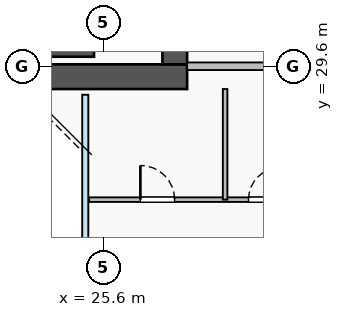
"""IFC4 building model, lengths in metres.
Left out: names, types, materials, properties, quantities, classifications, styles, units other than length and angle.
Written with IfcOpenShell. Run it as: python <this file> out.ifc"""

import sys

from ifc_helpers import new_model, si_unit, direction, frame, frame_2d, origin, place, context, subcontext, project, spatial, rectangle, extrude, source, transform, mapped, element, fill, save


model = new_model("IFC4")
c1 = context("Model", 3, precision=1e-05, world=origin(), true_north=direction((0.0, 1.0)))
c2 = subcontext(c1, "Body", "Model", "MODEL_VIEW")
j1 = project(units=[si_unit("LENGTHUNIT", "METRE"), si_unit("PLANEANGLEUNIT", "RADIAN")], contexts=[c1])
p1 = place(None, origin())
s1 = spatial("IfcSite", under=j1, at=p1, CompositionType="ELEMENT")
p2 = place(p1, origin())
s2 = spatial("IfcBuilding", under=s1, at=p2, CompositionType="ELEMENT")
p3 = place(p2, frame((0.0, 0.0, 100.25)))
s3 = spatial("IfcBuildingStorey", under=s2, at=p3, CompositionType="ELEMENT", Elevation=100.25)
p4 = place(p3, frame((18.2, 29.95, 0.0), z_axis=(0.0, 0.0, 1.0), x_axis=(1.0, 0.0, 0.0)))
e1 = element("IfcWall", 1, at=p4, inside=s3, PredefinedType="SHEAR", context=c2, shape_type="SweptSolid", body=[
    extrude(rectangle(XDim=7.15, YDim=0.2, at=frame_2d((3.575, 0.0))), origin(), (0.0, 0.0, 1.0), 3.25),
])
p5 = place(p3, frame((10.2, 29.325, 0.0), z_axis=(0.0, 0.0, 1.0), x_axis=(1.0, 0.0, 0.0)))
e2 = element("IfcWall", 2, at=p5, inside=s3, PredefinedType="SHEAR", context=c2, shape_type="SweptSolid", body=[
    extrude(rectangle(XDim=17.6, YDim=0.65, at=frame_2d((8.8, 0.0))), origin(), (0.0, 0.0, 1.0), 3.25),
])
p6 = place(p3, frame((27.475, 29.65, 0.0), z_axis=(0.0, 0.0, 1.0), x_axis=(0.0, 1.0, 0.0)))
e3 = element("IfcWall", 3, at=p6, inside=s3, PredefinedType="SHEAR", context=c2, shape_type="SweptSolid", body=[
    extrude(rectangle(XDim=5.9, YDim=0.65, at=frame_2d((2.95, 0.0))), origin(), (0.0, 0.0, 1.0), 3.25),
])
p7 = place(p6, frame((1.1, 0.0, 0.0)))
e4 = element("IfcOpeningElement", 4, at=p7, cuts=e3, PredefinedType="OPENING", context=c2, shape_type="SweptSolid", body=[
    extrude(rectangle(XDim=1.3, YDim=2.05, at=frame_2d((0.65, 1.025))), frame((0.0, 0.335, 0.0), z_axis=(0.0, -1.0, 0.0), x_axis=(1.0, 0.0, 0.0)), (0.0, 0.0, 1.0), 0.67),
])
p8 = place(p3, frame((27.8, 29.6, 0.0), z_axis=(0.0, 0.0, 1.0), x_axis=(1.0, 0.0, 0.0)))
e5 = element("IfcWall", 5, at=p8, inside=s3, PredefinedType="PARTITIONING", context=c2, shape_type="SweptSolid", body=[
    extrude(rectangle(XDim=3.1, YDim=0.2, at=frame_2d((1.55, 0.0))), origin(), (0.0, 0.0, 1.0), 3.07),
])
p9 = place(p3, frame((25.22, 26.09, 0.0), z_axis=(0.0, 0.0, 1.0), x_axis=(1.0, 0.0, 0.0)))
e6 = element("IfcWall", 6, at=p9, inside=s3, PredefinedType="PLUMBINGWALL", context=c2, shape_type="SweptSolid", body=[
    extrude(rectangle(XDim=5.68, YDim=0.12, at=frame_2d((2.84, 0.0))), origin(), (0.0, 0.0, 1.0), 2.625),
])
p10 = place(p9, frame((1.35, 0.0, 0.0)))
e7 = element("IfcOpeningElement", 7, at=p10, cuts=e6, PredefinedType="OPENING", context=c2, shape_type="SweptSolid", body=[
    extrude(rectangle(XDim=0.9, YDim=2.05, at=frame_2d((0.45, 1.025))), frame((0.0, 0.07, 0.0), z_axis=(0.0, -1.0, 0.0), x_axis=(1.0, 0.0, 0.0)), (0.0, 0.0, 1.0), 0.14),
])
p11 = place(p9, frame((4.195, 0.0, 0.0)))
e8 = element("IfcOpeningElement", 8, at=p11, cuts=e6, PredefinedType="OPENING", context=c2, shape_type="SweptSolid", body=[
    extrude(rectangle(XDim=0.85, YDim=2.05, at=frame_2d((0.425, 1.025))), frame((0.0, 0.07, 0.0), z_axis=(0.0, -1.0, 0.0), x_axis=(1.0, 0.0, 0.0)), (0.0, 0.0, 1.0), 0.14),
])
p12 = place(p3, frame((28.8, 26.09, 0.0), z_axis=(0.0, 0.0, 1.0), x_axis=(0.0, 1.0, 0.0)))
e9 = element("IfcWall", 9, at=p12, inside=s3, PredefinedType="PLUMBINGWALL", context=c2, shape_type="SweptSolid", body=[
    extrude(rectangle(XDim=2.91, YDim=0.12, at=frame_2d((1.455, 0.0))), origin(), (0.0, 0.0, 1.0), 3.07),
])
m1 = source(origin(), c2, "Body", "SweptSolid", [
    extrude(rectangle(XDim=0.9, YDim=2.05, at=frame_2d((0.45, 1.025))), frame((0.0, 0.025, 0.0), z_axis=(0.0, -1.0, 0.0), x_axis=(1.0, 0.0, 0.0)), (0.0, 0.0, 1.0), 0.05),
])
p13 = place(p10, origin())
e10 = element("IfcDoor", 10, at=p13, inside=s3, OperationType="SINGLE_SWING_LEFT", PredefinedType="DOOR", context=c2, shape_type="MappedRepresentation", body=[
    mapped(m1, transform((0.0, 0.0, 0.0), x_axis=(1.0, 0.0, 0.0), y_axis=(0.0, 1.0, 0.0), z_axis=(0.0, 0.0, 1.0), scale=1.0)),
])
fill(e7, e10)
m2 = source(origin(), c2, "Body", "SweptSolid", [
    extrude(rectangle(XDim=0.85, YDim=2.05, at=frame_2d((0.425, 1.025))), frame((0.0, 0.025, 0.0), z_axis=(0.0, -1.0, 0.0), x_axis=(1.0, 0.0, 0.0)), (0.0, 0.0, 1.0), 0.05),
])
p14 = place(p11, origin())
e11 = element("IfcDoor", 11, at=p14, inside=s3, OperationType="SINGLE_SWING_RIGHT", PredefinedType="DOOR", context=c2, shape_type="MappedRepresentation", body=[
    mapped(m2, transform((0.0, 0.0, 0.0), x_axis=(1.0, 0.0, 0.0), y_axis=(0.0, 1.0, 0.0), z_axis=(0.0, 0.0, 1.0), scale=1.0)),
])
fill(e8, e11)
save(model, sys.argv[1])
